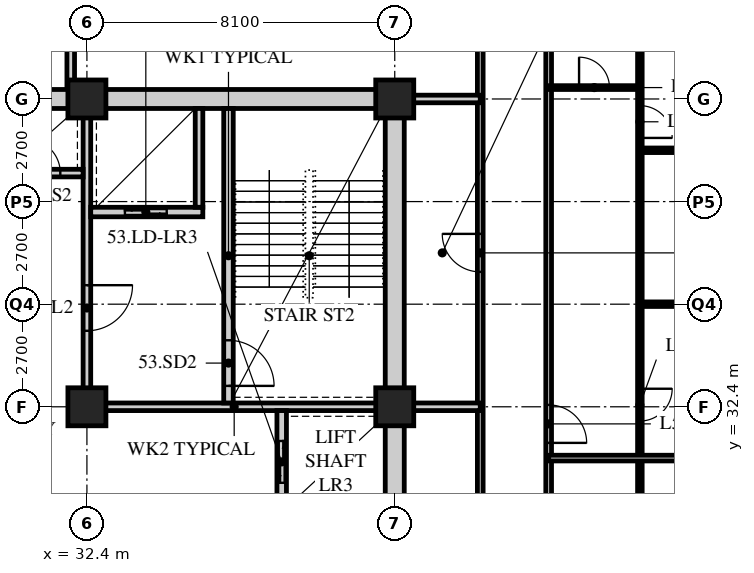
"""IFC4 building model, lengths in metres.
Left out: names, types, materials, properties, quantities, classifications, styles, units other than length and angle.
Written with IfcOpenShell. Run it as: python <this file> out.ifc"""

import sys

from ifc_helpers import new_model, si_unit, direction, frame, frame_2d, origin, origin_2d, place, context, subcontext, project, spatial, rectangle, hollow_rectangle, extrude, element, fill, save


model = new_model("IFC4")
c1 = context("Model", 3, precision=1e-05, world=origin(), true_north=direction((0.0, 1.0)))
c2 = subcontext(c1, "Body", "Model", "MODEL_VIEW")
j1 = project(units=[si_unit("LENGTHUNIT", "METRE"), si_unit("PLANEANGLEUNIT", "RADIAN")], contexts=[c1])
p1 = place(None, origin())
s1 = spatial("IfcSite", under=j1, at=p1, CompositionType="ELEMENT")
p2 = place(p1, origin())
s2 = spatial("IfcBuilding", under=s1, at=p2, CompositionType="ELEMENT")
p3 = place(p2, frame((0.0, 0.0, 206.4)))
s3 = spatial("IfcBuildingStorey", under=s2, at=p3, CompositionType="ELEMENT", Elevation=206.4)
for number, where, z_axis, x_axis in (
    (1, (32.4, 32.4, 0.0), (0.0, 0.0, 1.0), (1.0, 0.0, 0.0)),
    (2, (32.4, 40.5, 0.0), (0.0, 0.0, 1.0), (1.0, 0.0, 0.0)),
    (3, (40.5, 32.4, 0.0), (0.0, 0.0, 1.0), (1.0, 0.0, 0.0)),
    (4, (40.5, 40.5, 0.0), (0.0, 0.0, 1.0), (1.0, 0.0, 0.0)),
):
    element("IfcColumn", number, at=place(p3, frame(where, z_axis=z_axis, x_axis=x_axis)), inside=s3, PredefinedType="COLUMN", context=c2, shape_type="SweptSolid", body=[
        extrude(hollow_rectangle(XDim=1.0, YDim=1.0, WallThickness=0.1, at=origin_2d()), origin(), (0.0, 0.0, 1.0), 3.6),
    ])
p4 = place(p3, frame((44.55, 18.9, 0.0), z_axis=(0.0, 0.0, 1.0), x_axis=(0.0, 1.0, 0.0)))
e5 = element("IfcWall", 5, at=p4, inside=s3, PredefinedType="PARTITIONING", context=c2, shape_type="SweptSolid", body=[
    extrude(rectangle(XDim=28.35, YDim=0.15, at=frame_2d((14.175, 0.0))), origin(), (0.0, 0.0, 1.0), 3.39),
])
p5 = place(p4, frame((0.4, 0.0, 0.0)))
e6 = element("IfcOpeningElement", 6, at=p5, cuts=e5, PredefinedType="OPENING", context=c2, shape_type="SweptSolid", body=[
    extrude(rectangle(XDim=1.0, YDim=2.1, at=frame_2d((0.5, 1.05))), frame((0.0, 0.085, 0.0), z_axis=(0.0, -1.0, 0.0), x_axis=(1.0, 0.0, 0.0)), (0.0, 0.0, 1.0), 0.17),
])
p6 = place(p4, frame((12.55, 0.0, 0.0)))
e7 = element("IfcOpeningElement", 7, at=p6, cuts=e5, PredefinedType="OPENING", context=c2, shape_type="SweptSolid", body=[
    extrude(rectangle(XDim=1.0, YDim=2.1, at=frame_2d((0.5, 1.05))), frame((0.0, 0.085, 0.0), z_axis=(0.0, -1.0, 0.0), x_axis=(1.0, 0.0, 0.0)), (0.0, 0.0, 1.0), 0.17),
])
p7 = place(p4, frame((26.65, 0.0, 0.0)))
e8 = element("IfcOpeningElement", 8, at=p7, cuts=e5, PredefinedType="OPENING", context=c2, shape_type="SweptSolid", body=[
    extrude(rectangle(XDim=1.0, YDim=2.1, at=frame_2d((0.5, 1.05))), frame((0.0, 0.085, 0.0), z_axis=(0.0, -1.0, 0.0), x_axis=(1.0, 0.0, 0.0)), (0.0, 0.0, 1.0), 0.17),
])
p8 = place(p3, frame((42.75, 20.7, 0.0), z_axis=(0.0, 0.0, 1.0), x_axis=(0.0, 1.0, 0.0)))
e9 = element("IfcWall", 9, at=p8, inside=s3, PredefinedType="PARTITIONING", context=c2, shape_type="SweptSolid", body=[
    extrude(rectangle(XDim=24.75, YDim=0.15, at=frame_2d((12.375, 0.0))), origin(), (0.0, 0.0, 1.0), 3.39),
])
p9 = place(p8, frame((7.15, 0.0, 0.0)))
e10 = element("IfcOpeningElement", 10, at=p9, cuts=e9, PredefinedType="OPENING", context=c2, shape_type="SweptSolid", body=[
    extrude(rectangle(XDim=1.0, YDim=2.1, at=frame_2d((0.5, 1.05))), frame((0.0, 0.085, 0.0), z_axis=(0.0, -1.0, 0.0), x_axis=(1.0, 0.0, 0.0)), (0.0, 0.0, 1.0), 0.17),
])
p10 = place(p8, frame((15.25, 0.0, 0.0)))
e11 = element("IfcOpeningElement", 11, at=p10, cuts=e9, PredefinedType="OPENING", context=c2, shape_type="SweptSolid", body=[
    extrude(rectangle(XDim=1.0, YDim=2.1, at=frame_2d((0.5, 1.05))), frame((0.0, 0.085, 0.0), z_axis=(0.0, -1.0, 0.0), x_axis=(1.0, 0.0, 0.0)), (0.0, 0.0, 1.0), 0.17),
])
p11 = place(p3, frame((40.5, 32.4, 0.0), z_axis=(0.0, 0.0, 1.0), x_axis=(1.0, 0.0, 0.0)))
e12 = element("IfcWall", 12, at=p11, inside=s3, PredefinedType="SOLIDWALL", context=c2, shape_type="SweptSolid", body=[
    extrude(rectangle(XDim=2.25, YDim=0.2, at=frame_2d((1.125, 0.0))), origin(), (0.0, 0.0, 1.0), 3.39),
])
p12 = place(p3, frame((31.974, 45.45, 0.0), z_axis=(0.0, 0.0, 1.0), x_axis=(0.0, -1.0, 0.0)))
e13 = element("IfcWall", 13, at=p12, inside=s3, PredefinedType="SOLIDWALL", context=c2, shape_type="SweptSolid", body=[
    extrude(rectangle(XDim=4.95, YDim=0.2, at=frame_2d((2.475, 0.0))), origin(), (0.0, 0.0, 1.0), 2.69),
])
p13 = place(p3, frame((40.5, 40.5, 0.0), z_axis=(0.0, 0.0, 1.0), x_axis=(1.0, 0.0, 0.0)))
e14 = element("IfcWall", 14, at=p13, inside=s3, PredefinedType="SOLIDWALL", context=c2, shape_type="SweptSolid", body=[
    extrude(rectangle(XDim=2.25, YDim=0.2, at=frame_2d((1.125, 0.0))), origin(), (0.0, 0.0, 1.0), 3.39),
])
p14 = place(p3, frame((46.95, 18.9, 0.0), z_axis=(0.0, 0.0, 1.0), x_axis=(0.0, 1.0, 0.0)))
e15 = element("IfcWall", 15, at=p14, inside=s3, PredefinedType="PARTITIONING", context=c2, shape_type="SweptSolid", body=[
    extrude(rectangle(XDim=24.3, YDim=0.12, at=frame_2d((12.15, 0.0))), origin(), (0.0, 0.0, 1.0), 3.39),
])
p15 = place(p14, frame((0.975, 0.0, 0.0)))
e16 = element("IfcOpeningElement", 16, at=p15, cuts=e15, PredefinedType="OPENING", context=c2, shape_type="SweptSolid", body=[
    extrude(rectangle(XDim=0.85, YDim=2.1, at=frame_2d((0.425, 1.05))), frame((0.0, 0.07, 0.0), z_axis=(0.0, -1.0, 0.0), x_axis=(1.0, 0.0, 0.0)), (0.0, 0.0, 1.0), 0.14),
])
p16 = place(p14, frame((8.425, 0.0, 0.0)))
e17 = element("IfcOpeningElement", 17, at=p16, cuts=e15, PredefinedType="OPENING", context=c2, shape_type="SweptSolid", body=[
    extrude(rectangle(XDim=0.85, YDim=2.1, at=frame_2d((0.425, 1.05))), frame((0.0, 0.07, 0.0), z_axis=(0.0, -1.0, 0.0), x_axis=(1.0, 0.0, 0.0)), (0.0, 0.0, 1.0), 0.14),
])
p17 = place(p14, frame((13.125, 0.0, 0.0)))
e18 = element("IfcOpeningElement", 18, at=p17, cuts=e15, PredefinedType="OPENING", context=c2, shape_type="SweptSolid", body=[
    extrude(rectangle(XDim=0.85, YDim=2.1, at=frame_2d((0.425, 1.05))), frame((0.0, 0.07, 0.0), z_axis=(0.0, -1.0, 0.0), x_axis=(1.0, 0.0, 0.0)), (0.0, 0.0, 1.0), 0.14),
])
p18 = place(p14, frame((20.575, 0.0, 0.0)))
e19 = element("IfcOpeningElement", 19, at=p18, cuts=e15, PredefinedType="OPENING", context=c2, shape_type="SweptSolid", body=[
    extrude(rectangle(XDim=0.85, YDim=2.1, at=frame_2d((0.425, 1.05))), frame((0.0, 0.07, 0.0), z_axis=(0.0, -1.0, 0.0), x_axis=(1.0, 0.0, 0.0)), (0.0, 0.0, 1.0), 0.14),
])
p19 = place(p3, frame((44.55, 31.05, 0.0), z_axis=(0.0, 0.0, 1.0), x_axis=(1.0, 0.0, 0.0)))
e20 = element("IfcWall", 20, at=p19, inside=s3, PredefinedType="PARTITIONING", context=c2, shape_type="SweptSolid", body=[
    extrude(rectangle(XDim=11.85, YDim=0.15, at=frame_2d((5.925, 0.0))), origin(), (0.0, 0.0, 1.0), 3.39),
])
p20 = place(p3, frame((44.55, 40.8, 0.0), z_axis=(0.0, 0.0, 1.0), x_axis=(1.0, 0.0, 0.0)))
e21 = element("IfcWall", 21, at=p20, inside=s3, PredefinedType="PARTITIONING", context=c2, shape_type="SweptSolid", body=[
    extrude(rectangle(XDim=2.4, YDim=0.1, at=frame_2d((1.2, 0.0))), origin(), (0.0, 0.0, 1.0), 3.39),
])
p21 = place(p20, frame((0.8, 0.0, 0.0)))
e22 = element("IfcOpeningElement", 22, at=p21, cuts=e21, PredefinedType="OPENING", context=c2, shape_type="SweptSolid", body=[
    extrude(rectangle(XDim=0.8, YDim=2.1, at=frame_2d((0.4, 1.05))), frame((0.0, 0.06, 0.0), z_axis=(0.0, -1.0, 0.0), x_axis=(1.0, 0.0, 0.0)), (0.0, 0.0, 1.0), 0.12),
])
p22 = place(p3, frame((46.95, 39.15, 0.0), z_axis=(0.0, 0.0, 1.0), x_axis=(1.0, 0.0, 0.0)))
e23 = element("IfcWall", 23, at=p22, inside=s3, PredefinedType="PARTITIONING", context=c2, shape_type="SweptSolid", body=[
    extrude(rectangle(XDim=9.45, YDim=0.12, at=frame_2d((4.725, 0.0))), origin(), (0.0, 0.0, 1.0), 3.39),
])
p23 = place(p3, frame((46.95, 35.1, 0.0), z_axis=(0.0, 0.0, 1.0), x_axis=(1.0, 0.0, 0.0)))
e24 = element("IfcWall", 24, at=p23, inside=s3, PredefinedType="PARTITIONING", context=c2, shape_type="SweptSolid", body=[
    extrude(rectangle(XDim=1.35, YDim=0.12, at=frame_2d((0.675, 0.0))), origin(), (0.0, 0.0, 1.0), 2.778),
])
p24 = place(p3, frame((15.95, 40.5, 0.0), z_axis=(0.0, 0.0, 1.0), x_axis=(1.0, 0.0, 0.0)))
e25 = element("IfcWall", 25, at=p24, inside=s3, PredefinedType="SOLIDWALL", context=c2, shape_type="SweptSolid", body=[
    extrude(rectangle(XDim=24.8, YDim=0.5, at=frame_2d((12.4, 0.0))), origin(), (0.0, 0.0, 1.0), 2.74),
])
p25 = place(p24, frame((11.5, 0.0, 0.0)))
e26 = element("IfcOpeningElement", 26, at=p25, cuts=e25, PredefinedType="OPENING", context=c2, shape_type="SweptSolid", body=[
    extrude(rectangle(XDim=1.8, YDim=2.4, at=frame_2d((0.9, 1.2))), frame((0.0, 0.26, 0.0), z_axis=(0.0, -1.0, 0.0), x_axis=(1.0, 0.0, 0.0)), (0.0, 0.0, 1.0), 0.52),
])
p26 = place(p3, frame((40.5, 24.55, 0.0), z_axis=(0.0, 0.0, 1.0), x_axis=(0.0, 1.0, 0.0)))
e27 = element("IfcWall", 27, at=p26, inside=s3, PredefinedType="SOLIDWALL", context=c2, shape_type="SweptSolid", body=[
    extrude(rectangle(XDim=15.7, YDim=0.5, at=frame_2d((7.85, 0.0))), origin(), (0.0, 0.0, 1.0), 2.778),
])
p27 = place(p3, frame((32.3, 32.4, 0.0), z_axis=(0.0, 0.0, 1.0), x_axis=(1.0, 0.0, 0.0)))
e28 = element("IfcWall", 28, at=p27, inside=s3, PredefinedType="SOLIDWALL", context=c2, shape_type="SweptSolid", body=[
    extrude(rectangle(XDim=7.95, YDim=0.2, at=frame_2d((3.975, 0.0))), origin(), (0.0, 0.0, 1.0), 2.778),
])
p28 = place(p3, frame((32.4, 32.5, 0.0), z_axis=(0.0, 0.0, 1.0), x_axis=(0.0, 1.0, 0.0)))
e29 = element("IfcWall", 29, at=p28, inside=s3, PredefinedType="SOLIDWALL", context=c2, shape_type="SweptSolid", body=[
    extrude(rectangle(XDim=7.75, YDim=0.2, at=frame_2d((3.875, 0.0))), origin(), (0.0, 0.0, 1.0), 2.778),
])
p29 = place(p28, frame((1.9, 0.0, 0.0)))
e30 = element("IfcOpeningElement", 30, at=p29, cuts=e29, PredefinedType="OPENING", context=c2, shape_type="SweptSolid", body=[
    extrude(rectangle(XDim=1.2, YDim=2.1, at=frame_2d((0.6, 1.05))), frame((0.0, 0.11, 0.0), z_axis=(0.0, -1.0, 0.0), x_axis=(1.0, 0.0, 0.0)), (0.0, 0.0, 1.0), 0.22),
])
p30 = place(p3, frame((37.525, 24.55, 0.0), z_axis=(0.0, 0.0, 1.0), x_axis=(0.0, 1.0, 0.0)))
e31 = element("IfcWall", 31, at=p30, inside=s3, PredefinedType="SOLIDWALL", context=c2, shape_type="SweptSolid", body=[
    extrude(rectangle(XDim=7.75, YDim=0.25, at=frame_2d((3.875, 0.0))), origin(), (0.0, 0.0, 1.0), 3.39),
])
p31 = place(p30, frame((0.65, 0.0, 0.0)))
e32 = element("IfcOpeningElement", 32, at=p31, cuts=e31, PredefinedType="OPENING", context=c2, shape_type="SweptSolid", body=[
    extrude(rectangle(XDim=1.1, YDim=2.4, at=frame_2d((0.55, 1.2))), frame((0.0, 0.135, 0.0), z_axis=(0.0, -1.0, 0.0), x_axis=(1.0, 0.0, 0.0)), (0.0, 0.0, 1.0), 0.27),
])
p32 = place(p30, frame((3.25, 0.0, 0.0)))
e33 = element("IfcOpeningElement", 33, at=p32, cuts=e31, PredefinedType="OPENING", context=c2, shape_type="SweptSolid", body=[
    extrude(rectangle(XDim=1.1, YDim=2.4, at=frame_2d((0.55, 1.2))), frame((0.0, 0.135, 0.0), z_axis=(0.0, -1.0, 0.0), x_axis=(1.0, 0.0, 0.0)), (0.0, 0.0, 1.0), 0.27),
])
p33 = place(p30, frame((5.85, 0.0, 0.0)))
e34 = element("IfcOpeningElement", 34, at=p33, cuts=e31, PredefinedType="OPENING", context=c2, shape_type="SweptSolid", body=[
    extrude(rectangle(XDim=1.1, YDim=2.4, at=frame_2d((0.55, 1.2))), frame((0.0, 0.135, 0.0), z_axis=(0.0, -1.0, 0.0), x_axis=(1.0, 0.0, 0.0)), (0.0, 0.0, 1.0), 0.27),
])
p34 = place(p3, frame((36.125, 32.5, 0.0), z_axis=(0.0, 0.0, 1.0), x_axis=(0.0, 1.0, 0.0)))
e35 = element("IfcWall", 35, at=p34, inside=s3, PredefinedType="SOLIDWALL", context=c2, shape_type="SweptSolid", body=[
    extrude(rectangle(XDim=7.75, YDim=0.25, at=frame_2d((3.875, 0.0))), origin(), (0.0, 0.0, 1.0), 3.39),
])
p35 = place(p34, frame((0.45, 0.0, 0.0)))
e36 = element("IfcOpeningElement", 36, at=p35, cuts=e35, PredefinedType="OPENING", context=c2, shape_type="SweptSolid", body=[
    extrude(rectangle(XDim=1.2, YDim=2.1, at=frame_2d((0.6, 1.05))), frame((0.0, 0.135, 0.0), z_axis=(0.0, -1.0, 0.0), x_axis=(1.0, 0.0, 0.0)), (0.0, 0.0, 1.0), 0.27),
])
p36 = place(p3, frame((32.5, 37.525, 0.0), z_axis=(0.0, 0.0, 1.0), x_axis=(1.0, 0.0, 0.0)))
e37 = element("IfcWall", 37, at=p36, inside=s3, PredefinedType="SOLIDWALL", context=c2, shape_type="SweptSolid", body=[
    extrude(rectangle(XDim=2.95, YDim=0.25, at=frame_2d((1.475, 0.0))), origin(), (0.0, 0.0, 1.0), 3.39),
])
p37 = place(p36, frame((0.9, 0.0, 0.0)))
e38 = element("IfcOpeningElement", 38, at=p37, cuts=e37, PredefinedType="OPENING", context=c2, shape_type="SweptSolid", body=[
    extrude(rectangle(XDim=1.1, YDim=2.4, at=frame_2d((0.55, 1.2))), frame((0.0, 0.135, 0.0), z_axis=(0.0, -1.0, 0.0), x_axis=(1.0, 0.0, 0.0)), (0.0, 0.0, 1.0), 0.27),
])
p38 = place(p3, frame((35.35, 37.65, 0.0), z_axis=(0.0, 0.0, 1.0), x_axis=(0.0, 1.0, 0.0)))
e39 = element("IfcWall", 39, at=p38, inside=s3, PredefinedType="SOLIDWALL", context=c2, shape_type="SweptSolid", body=[
    extrude(rectangle(XDim=2.6, YDim=0.2, at=frame_2d((1.3, 0.0))), origin(), (0.0, 0.0, 1.0), 3.39),
])
p39 = place(p3, frame((30.15, 38.55, 0.0), z_axis=(0.0, 0.0, 1.0), x_axis=(1.0, 0.0, 0.0)))
e40 = element("IfcWall", 40, at=p39, inside=s3, PredefinedType="SOLIDWALL", context=c2, shape_type="SweptSolid", body=[
    extrude(rectangle(XDim=2.15, YDim=0.2, at=frame_2d((1.075, 0.0))), origin(), (0.0, 0.0, 1.0), 3.39),
])
p40 = place(p39, frame((0.65, 0.0, 0.0)))
e41 = element("IfcOpeningElement", 41, at=p40, cuts=e40, PredefinedType="OPENING", context=c2, shape_type="SweptSolid", body=[
    extrude(rectangle(XDim=0.9, YDim=2.1, at=frame_2d((0.45, 1.05))), frame((0.0, 0.11, 0.0), z_axis=(0.0, -1.0, 0.0), x_axis=(1.0, 0.0, 0.0)), (0.0, 0.0, 1.0), 0.22),
])
p41 = place(p10, origin())
e42 = element("IfcDoor", 42, at=p41, inside=s3, OperationType="SINGLE_SWING_RIGHT", PredefinedType="DOOR", context=c2, shape_type="SweptSolid", body=[
    extrude(rectangle(XDim=1.0, YDim=2.1, at=frame_2d((0.5, 1.05))), frame((0.0, 0.025, 0.0), z_axis=(0.0, -1.0, 0.0), x_axis=(1.0, 0.0, 0.0)), (0.0, 0.0, 1.0), 0.05),
])
fill(e11, e42)
p42 = place(p21, origin())
e43 = element("IfcDoor", 43, at=p42, inside=s3, OperationType="SINGLE_SWING_LEFT", PredefinedType="DOOR", context=c2, shape_type="SweptSolid", body=[
    extrude(rectangle(XDim=0.8, YDim=2.1, at=frame_2d((0.4, 1.05))), frame((0.0, 0.025, 0.0), z_axis=(0.0, -1.0, 0.0), x_axis=(1.0, 0.0, 0.0)), (0.0, 0.0, 1.0), 0.05),
])
fill(e22, e43)
p43 = place(p6, origin())
e44 = element("IfcDoor", 44, at=p43, inside=s3, OperationType="SINGLE_SWING_RIGHT", PredefinedType="DOOR", context=c2, shape_type="SweptSolid", body=[
    extrude(rectangle(XDim=1.0, YDim=2.1, at=frame_2d((0.5, 1.05))), frame((0.0, 0.025, 0.0), z_axis=(0.0, -1.0, 0.0), x_axis=(1.0, 0.0, 0.0)), (0.0, 0.0, 1.0), 0.05),
])
fill(e7, e44)
p44 = place(p17, origin())
e45 = element("IfcDoor", 45, at=p44, inside=s3, OperationType="SINGLE_SWING_LEFT", PredefinedType="DOOR", context=c2, shape_type="SweptSolid", body=[
    extrude(rectangle(XDim=0.85, YDim=2.1, at=frame_2d((0.425, 1.05))), frame((0.0, 0.025, 0.0), z_axis=(0.0, -1.0, 0.0), x_axis=(1.0, 0.0, 0.0)), (0.0, 0.0, 1.0), 0.05),
])
fill(e18, e45)
p45 = place(p18, origin())
e46 = element("IfcDoor", 46, at=p45, inside=s3, OperationType="SINGLE_SWING_RIGHT", PredefinedType="DOOR", context=c2, shape_type="SweptSolid", body=[
    extrude(rectangle(XDim=0.85, YDim=2.1, at=frame_2d((0.425, 1.05))), frame((0.0, 0.025, 0.0), z_axis=(0.0, -1.0, 0.0), x_axis=(1.0, 0.0, 0.0)), (0.0, 0.0, 1.0), 0.05),
])
fill(e19, e46)
p46 = place(p35, origin())
e47 = element("IfcDoor", 47, at=p46, inside=s3, OperationType="SINGLE_SWING_RIGHT", PredefinedType="DOOR", context=c2, shape_type="SweptSolid", body=[
    extrude(rectangle(XDim=1.2, YDim=2.1, at=frame_2d((0.6, 1.05))), frame((0.0, 0.025, 0.0), z_axis=(0.0, -1.0, 0.0), x_axis=(1.0, 0.0, 0.0)), (0.0, 0.0, 1.0), 0.05),
])
fill(e36, e47)
p47 = place(p29, origin())
e48 = element("IfcDoor", 48, at=p47, inside=s3, OperationType="SINGLE_SWING_LEFT", PredefinedType="DOOR", context=c2, shape_type="SweptSolid", body=[
    extrude(rectangle(XDim=1.2, YDim=2.1, at=frame_2d((0.6, 1.05))), frame((0.0, 0.025, 0.0), z_axis=(0.0, -1.0, 0.0), x_axis=(1.0, 0.0, 0.0)), (0.0, 0.0, 1.0), 0.05),
])
fill(e30, e48)
p48 = place(p40, origin())
e49 = element("IfcDoor", 49, at=p48, inside=s3, OperationType="SINGLE_SWING_LEFT", PredefinedType="DOOR", context=c2, shape_type="SweptSolid", body=[
    extrude(rectangle(XDim=0.9, YDim=2.1, at=frame_2d((0.45, 1.05))), frame((0.0, 0.025, 0.0), z_axis=(0.0, -1.0, 0.0), x_axis=(1.0, 0.0, 0.0)), (0.0, 0.0, 1.0), 0.05),
])
fill(e41, e49)
p49 = place(p33, origin())
e50 = element("IfcDoor", 50, at=p49, inside=s3, OperationType="DOUBLE_DOOR_SLIDING", PredefinedType="DOOR", context=c2, shape_type="SweptSolid", body=[
    extrude(rectangle(XDim=1.1, YDim=2.4, at=frame_2d((0.55, 1.2))), frame((0.0, 0.025, 0.0), z_axis=(0.0, -1.0, 0.0), x_axis=(1.0, 0.0, 0.0)), (0.0, 0.0, 1.0), 0.05),
])
fill(e34, e50)
p50 = place(p37, origin())
e51 = element("IfcDoor", 51, at=p50, inside=s3, OperationType="DOUBLE_DOOR_SLIDING", PredefinedType="DOOR", context=c2, shape_type="SweptSolid", body=[
    extrude(rectangle(XDim=1.1, YDim=2.4, at=frame_2d((0.55, 1.2))), frame((0.0, 0.025, 0.0), z_axis=(0.0, -1.0, 0.0), x_axis=(1.0, 0.0, 0.0)), (0.0, 0.0, 1.0), 0.05),
])
fill(e38, e51)
save(model, sys.argv[1])
